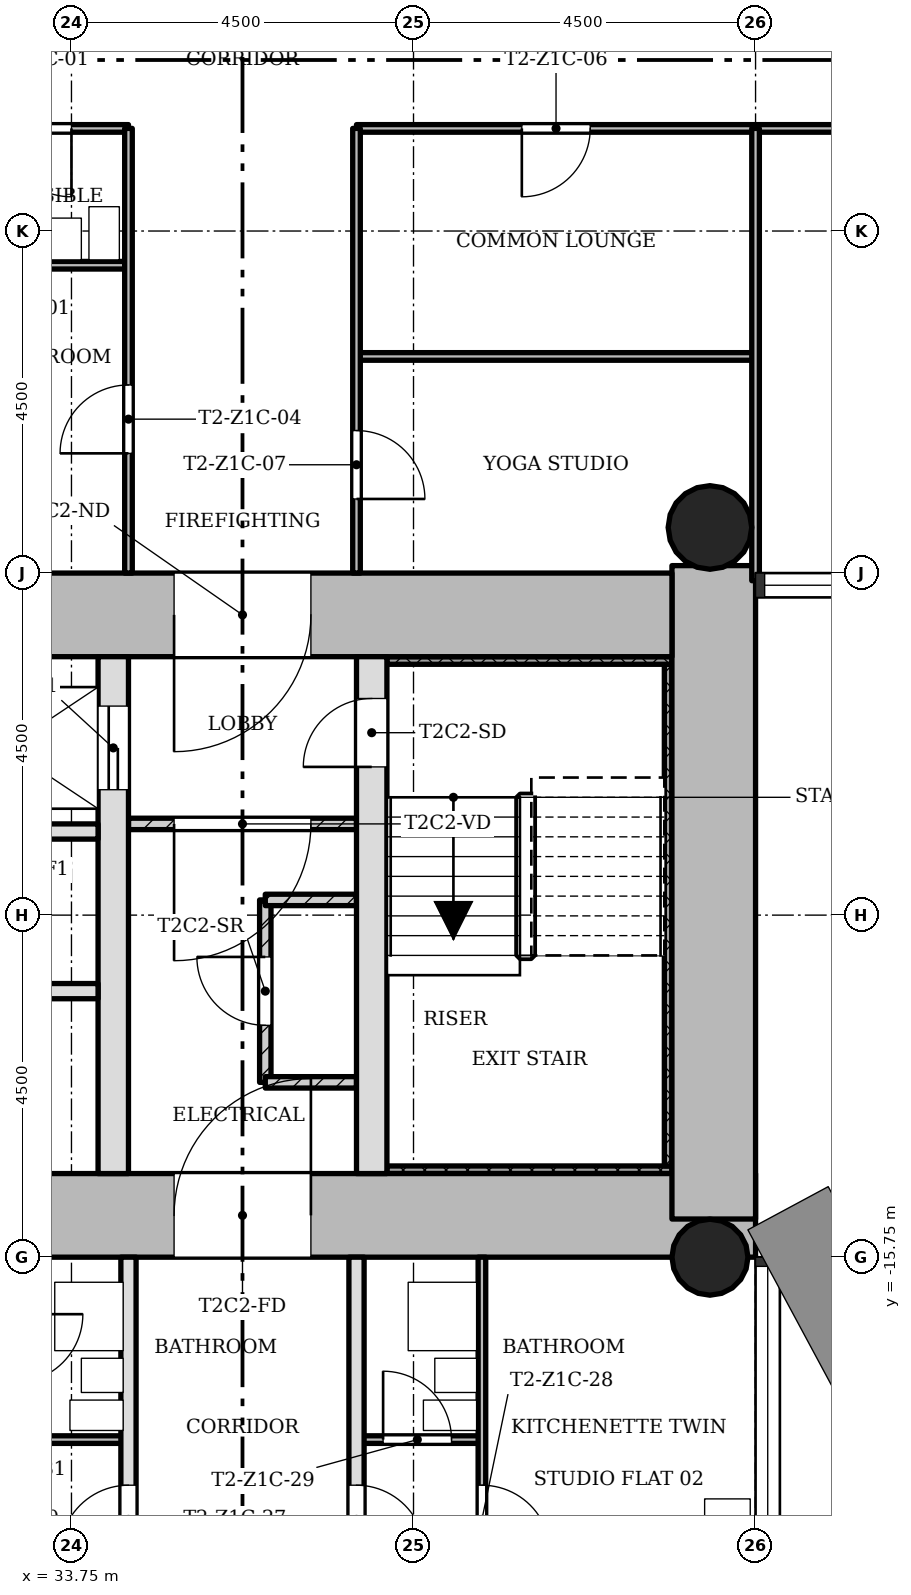
"""IFC4 building model, lengths in metres.
Left out: names, types, materials, properties, quantities, classifications, styles, units other than length and angle.
Written with IfcOpenShell. Run it as: python <this file> out.ifc"""

import sys

from ifc_helpers import new_model, si_unit, direction, frame, frame_2d, origin, origin_2d, place, context, subcontext, project, spatial, rectangle, hollow_circle, extrude, element, fill, save


model = new_model("IFC4")
c1 = context("Model", 3, precision=1e-05, world=origin(), true_north=direction((0.0, 1.0)))
c2 = subcontext(c1, "Body", "Model", "MODEL_VIEW")
j1 = project(units=[si_unit("LENGTHUNIT", "METRE"), si_unit("PLANEANGLEUNIT", "RADIAN")], contexts=[c1])
p1 = place(None, origin())
s1 = spatial("IfcSite", under=j1, at=p1, CompositionType="ELEMENT")
p2 = place(p1, origin())
s2 = spatial("IfcBuilding", under=s1, at=p2, CompositionType="ELEMENT")
p3 = place(p2, frame((0.0, 0.0, 51.7)))
s3 = spatial("IfcBuildingStorey", under=s2, at=p3, CompositionType="ELEMENT", Elevation=51.7)
p4 = place(p3, frame((30.35, -15.2, 0.0), z_axis=(0.0, 0.0, 1.0), x_axis=(1.0, 0.0, 0.0)))
e1 = element("IfcWall", 1, at=p4, inside=s3, PredefinedType="SHEAR", context=c2, shape_type="SweptSolid", body=[
    extrude(rectangle(XDim=12.4, YDim=1.1, at=frame_2d((6.2, 0.0))), origin(), (0.0, 0.0, 1.0), 3.4),
])
p5 = place(p4, frame((4.75, 0.0, 0.0)))
e2 = element("IfcOpeningElement", 2, at=p5, cuts=e1, PredefinedType="OPENING", context=c2, shape_type="SweptSolid", body=[
    extrude(rectangle(XDim=1.8, YDim=2.1, at=frame_2d((0.9, 1.05))), frame((0.0, 0.56, 0.0), z_axis=(0.0, -1.0, 0.0), x_axis=(1.0, 0.0, 0.0)), (0.0, 0.0, 1.0), 1.12),
])
p6 = place(p3, frame((42.2, -15.248, 0.0), z_axis=(0.0, 0.0, 1.0), x_axis=(0.0, 1.0, 0.0)))
e3 = element("IfcWall", 3, at=p6, inside=s3, PredefinedType="SHEAR", context=c2, shape_type="SweptSolid", body=[
    extrude(rectangle(XDim=8.596, YDim=1.1, at=frame_2d((4.298, 0.0))), origin(), (0.0, 0.0, 1.0), 3.4),
])
p7 = place(p3, frame((41.65, -7.3, 0.0), z_axis=(0.0, 0.0, 1.0), x_axis=(-1.0, 0.0, 0.0)))
e4 = element("IfcWall", 4, at=p7, inside=s3, PredefinedType="SHEAR", context=c2, shape_type="SweptSolid", body=[
    extrude(rectangle(XDim=12.4, YDim=1.1, at=frame_2d((6.2, 0.0))), origin(), (0.0, 0.0, 1.0), 3.4),
])
p8 = place(p7, frame((4.75, 0.0, 0.0)))
e5 = element("IfcOpeningElement", 5, at=p8, cuts=e4, PredefinedType="OPENING", context=c2, shape_type="SweptSolid", body=[
    extrude(rectangle(XDim=1.8, YDim=2.1, at=frame_2d((0.9, 1.05))), frame((0.0, 0.56, 0.0), z_axis=(0.0, -1.0, 0.0), x_axis=(1.0, 0.0, 0.0)), (0.0, 0.0, 1.0), 1.12),
])
p9 = place(p3, frame((34.3, -14.65, 0.0), z_axis=(0.0, 0.0, 1.0), x_axis=(0.0, 1.0, 0.0)))
e6 = element("IfcWall", 6, at=p9, inside=s3, PredefinedType="SHEAR", context=c2, shape_type="SweptSolid", body=[
    extrude(rectangle(XDim=6.8, YDim=0.4, at=frame_2d((3.4, 0.0))), origin(), (0.0, 0.0, 1.0), 3.4),
])
p10 = place(p9, frame((5.05, 0.0, 0.0)))
e7 = element("IfcOpeningElement", 7, at=p10, cuts=e6, PredefinedType="OPENING", context=c2, shape_type="SweptSolid", body=[
    extrude(rectangle(XDim=1.1, YDim=2.1, at=frame_2d((0.55, 1.05))), frame((0.0, 0.21, 0.0), z_axis=(0.0, -1.0, 0.0), x_axis=(1.0, 0.0, 0.0)), (0.0, 0.0, 1.0), 0.42),
])
p11 = place(p3, frame((37.7, -14.65, 0.0), z_axis=(0.0, 0.0, 1.0), x_axis=(0.0, 1.0, 0.0)))
e8 = element("IfcWall", 8, at=p11, inside=s3, PredefinedType="SHEAR", context=c2, shape_type="SweptSolid", body=[
    extrude(rectangle(XDim=6.8, YDim=0.4, at=frame_2d((3.4, 0.0))), origin(), (0.0, 0.0, 1.0), 3.4),
])
p12 = place(p11, frame((5.35, 0.0, 0.0)))
e9 = element("IfcOpeningElement", 9, at=p12, cuts=e8, PredefinedType="OPENING", context=c2, shape_type="SweptSolid", body=[
    extrude(rectangle(XDim=0.9, YDim=2.1, at=frame_2d((0.45, 1.05))), frame((0.0, 0.21, 0.0), z_axis=(0.0, -1.0, 0.0), x_axis=(1.0, 0.0, 0.0)), (0.0, 0.0, 1.0), 0.42),
])
p13 = place(p3, frame((42.15, -15.75, 0.0), z_axis=(0.0, 0.0, 1.0), x_axis=(1.0, 0.0, 0.0)))
e10 = element("IfcColumn", 10, at=p13, inside=s3, PredefinedType="COLUMN", context=c2, shape_type="SweptSolid", body=[
    extrude(hollow_circle(Radius=0.5, WallThickness=0.036, at=origin_2d()), origin(), (0.0, 0.0, 1.0), 3.4),
])
p14 = place(p3, frame((42.15, -6.15, 0.0), z_axis=(0.0, 0.0, 1.0), x_axis=(1.0, 0.0, 0.0)))
e11 = element("IfcColumn", 11, at=p14, inside=s3, PredefinedType="COLUMN", context=c2, shape_type="SweptSolid", body=[
    extrude(hollow_circle(Radius=0.55, WallThickness=0.04, at=origin_2d()), origin(), (0.0, 0.0, 1.0), 3.4),
])
p15 = place(p3, frame((34.5, -10.05, 0.0), z_axis=(0.0, 0.0, 1.0), x_axis=(1.0, 0.0, 0.0)))
e12 = element("IfcWall", 12, at=p15, inside=s3, PredefinedType="PARTITIONING", context=c2, shape_type="SweptSolid", body=[
    extrude(rectangle(XDim=3.0, YDim=0.15, at=frame_2d((1.5, 0.0))), origin(), (0.0, 0.0, 1.0), 3.0),
])
p16 = place(p15, frame((0.6, 0.0, 0.0)))
e13 = element("IfcOpeningElement", 13, at=p16, cuts=e12, PredefinedType="OPENING", context=c2, shape_type="SweptSolid", body=[
    extrude(rectangle(XDim=1.8, YDim=2.1, at=frame_2d((0.9, 1.05))), frame((0.0, 0.085, 0.0), z_axis=(0.0, -1.0, 0.0), x_axis=(1.0, 0.0, 0.0)), (0.0, 0.0, 1.0), 0.17),
])
for number, where, z_axis, x_axis in (
    (14, (30.35, -10.15, 0.0), (0.0, 0.0, 1.0), (1.0, 0.0, 0.0)),
    (15, (30.35, -12.25, 0.0), (0.0, 0.0, 1.0), (1.0, 0.0, 0.0)),
):
    element("IfcWall", number, at=place(p3, frame(where, z_axis=z_axis, x_axis=x_axis)), inside=s3, PredefinedType="SOLIDWALL", context=c2, shape_type="SweptSolid", body=[
        extrude(rectangle(XDim=3.75, YDim=0.2, at=frame_2d((1.875, 0.0))), origin(), (0.0, 0.0, 1.0), 3.0),
    ])
p17 = place(p3, frame((36.3, -11.05, 0.0), z_axis=(0.0, 0.0, 1.0), x_axis=(0.0, -1.0, 0.0)))
e16 = element("IfcWall", 16, at=p17, inside=s3, PredefinedType="PARTITIONING", context=c2, shape_type="SweptSolid", body=[
    extrude(rectangle(XDim=2.4, YDim=0.15, at=frame_2d((1.2, 0.0))), origin(), (0.0, 0.0, 1.0), 3.0),
])
p18 = place(p17, frame((0.75, 0.0, 0.0)))
e17 = element("IfcOpeningElement", 17, at=p18, cuts=e16, PredefinedType="OPENING", context=c2, shape_type="SweptSolid", body=[
    extrude(rectangle(XDim=0.9, YDim=2.1, at=frame_2d((0.45, 1.05))), frame((0.0, 0.085, 0.0), z_axis=(0.0, -1.0, 0.0), x_axis=(1.0, 0.0, 0.0)), (0.0, 0.0, 1.0), 0.17),
])
for number, where, z_axis, x_axis in (
    (18, (36.3, -11.05, 0.0), (0.0, 0.0, 1.0), (1.0, 0.0, 0.0)),
    (19, (36.3, -13.45, 0.0), (0.0, 0.0, 1.0), (1.0, 0.0, 0.0)),
):
    element("IfcWall", number, at=place(p3, frame(where, z_axis=z_axis, x_axis=x_axis)), inside=s3, PredefinedType="PARTITIONING", context=c2, shape_type="SweptSolid", body=[
        extrude(rectangle(XDim=1.2, YDim=0.15, at=frame_2d((0.6, 0.0))), origin(), (0.0, 0.0, 1.0), 3.0),
    ])
p19 = place(p3, frame((39.15, -18.15, 0.0), z_axis=(0.0, 0.0, 1.0), x_axis=(-1.0, 0.0, 0.0)))
e20 = element("IfcWall", 20, at=p19, inside=s3, PredefinedType="PARTITIONING", context=c2, shape_type="SweptSolid", body=[
    extrude(rectangle(XDim=1.65, YDim=0.1, at=frame_2d((0.825, 0.0))), origin(), (0.0, 0.0, 1.0), 3.0),
])
p20 = place(p19, frame((0.4, 0.0, 0.0)))
e21 = element("IfcOpeningElement", 21, at=p20, cuts=e20, PredefinedType="OPENING", context=c2, shape_type="SweptSolid", body=[
    extrude(rectangle(XDim=0.9, YDim=2.1, at=frame_2d((0.45, 1.05))), frame((0.0, 0.06, 0.0), z_axis=(0.0, -1.0, 0.0), x_axis=(1.0, 0.0, 0.0)), (0.0, 0.0, 1.0), 0.12),
])
p21 = place(p3, frame((34.5, -18.15, 0.0), z_axis=(0.0, 0.0, 1.0), x_axis=(-1.0, 0.0, 0.0)))
e22 = element("IfcWall", 22, at=p21, inside=s3, PredefinedType="PARTITIONING", context=c2, shape_type="SweptSolid", body=[
    extrude(rectangle(XDim=1.5, YDim=0.1, at=frame_2d((0.75, 0.0))), origin(), (0.0, 0.0, 1.0), 3.0),
])
p22 = place(p3, frame((42.75, -3.9, 0.0), z_axis=(0.0, 0.0, 1.0), x_axis=(-1.0, 0.0, 0.0)))
e23 = element("IfcWall", 23, at=p22, inside=s3, PredefinedType="PARTITIONING", context=c2, shape_type="SweptSolid", body=[
    extrude(rectangle(XDim=5.25, YDim=0.1, at=frame_2d((2.625, 0.0))), origin(), (0.0, 0.0, 1.0), 3.0),
])
p23 = place(p3, frame((34.5, -2.7, 0.0), z_axis=(0.0, 0.0, 1.0), x_axis=(-1.0, 0.0, 0.0)))
e24 = element("IfcWall", 24, at=p23, inside=s3, PredefinedType="PARTITIONING", context=c2, shape_type="SweptSolid", body=[
    extrude(rectangle(XDim=2.4, YDim=0.1, at=frame_2d((1.2, 0.0))), origin(), (0.0, 0.0, 1.0), 3.0),
])
p24 = place(p3, frame((44.55, -0.9, 0.0), z_axis=(0.0, 0.0, 1.0), x_axis=(-1.0, 0.0, 0.0)))
e25 = element("IfcWall", 25, at=p24, inside=s3, PredefinedType="PARTITIONING", context=c2, shape_type="SweptSolid", body=[
    extrude(rectangle(XDim=7.05, YDim=0.1, at=frame_2d((3.525, 0.0))), origin(), (0.0, 0.0, 1.0), 3.0),
])
p25 = place(p24, frame((3.975, 0.0, 0.0)))
e26 = element("IfcOpeningElement", 26, at=p25, cuts=e25, PredefinedType="OPENING", context=c2, shape_type="SweptSolid", body=[
    extrude(rectangle(XDim=0.9, YDim=2.1, at=frame_2d((0.45, 1.05))), frame((0.0, 0.06, 0.0), z_axis=(0.0, -1.0, 0.0), x_axis=(1.0, 0.0, 0.0)), (0.0, 0.0, 1.0), 0.12),
])
p26 = place(p3, frame((34.5, -0.9, 0.0), z_axis=(0.0, 0.0, 1.0), x_axis=(-1.0, 0.0, 0.0)))
e27 = element("IfcWall", 27, at=p26, inside=s3, PredefinedType="PARTITIONING", context=c2, shape_type="SweptSolid", body=[
    extrude(rectangle(XDim=7.05, YDim=0.1, at=frame_2d((3.525, 0.0))), origin(), (0.0, 0.0, 1.0), 3.0),
])
p27 = place(p26, frame((0.75, 0.0, 0.0)))
e28 = element("IfcOpeningElement", 28, at=p27, cuts=e27, PredefinedType="OPENING", context=c2, shape_type="SweptSolid", body=[
    extrude(rectangle(XDim=0.9, YDim=2.1, at=frame_2d((0.45, 1.05))), frame((0.0, 0.06, 0.0), z_axis=(0.0, -1.0, 0.0), x_axis=(1.0, 0.0, 0.0)), (0.0, 0.0, 1.0), 0.12),
])
p28 = place(p26, frame((3.375, 0.0, 0.0)))
e29 = element("IfcOpeningElement", 29, at=p28, cuts=e27, PredefinedType="OPENING", context=c2, shape_type="SweptSolid", body=[
    extrude(rectangle(XDim=0.9, YDim=2.1, at=frame_2d((0.45, 1.05))), frame((0.0, 0.06, 0.0), z_axis=(0.0, -1.0, 0.0), x_axis=(1.0, 0.0, 0.0)), (0.0, 0.0, 1.0), 0.12),
])
p29 = place(p3, frame((42.75, -6.85, 0.0), z_axis=(0.0, 0.0, 1.0), x_axis=(0.0, 1.0, 0.0)))
e30 = element("IfcWall", 30, at=p29, inside=s3, PredefinedType="PARTITIONING", context=c2, shape_type="SweptSolid", body=[
    extrude(rectangle(XDim=5.95, YDim=0.1, at=frame_2d((2.975, 0.0))), origin(), (0.0, 0.0, 1.0), 3.0),
])
p30 = place(p3, frame((39.15, -20.25, 0.0), z_axis=(0.0, 0.0, 1.0), x_axis=(0.0, 1.0, 0.0)))
e31 = element("IfcWall", 31, at=p30, inside=s3, PredefinedType="PARTITIONING", context=c2, shape_type="SweptSolid", body=[
    extrude(rectangle(XDim=4.5, YDim=0.1, at=frame_2d((2.25, 0.0))), origin(), (0.0, 0.0, 1.0), 3.0),
])
p31 = place(p30, frame((0.6, 0.0, 0.0)))
e32 = element("IfcOpeningElement", 32, at=p31, cuts=e31, PredefinedType="OPENING", context=c2, shape_type="SweptSolid", body=[
    extrude(rectangle(XDim=0.9, YDim=2.1, at=frame_2d((0.45, 1.05))), frame((0.0, 0.06, 0.0), z_axis=(0.0, -1.0, 0.0), x_axis=(1.0, 0.0, 0.0)), (0.0, 0.0, 1.0), 0.12),
])
p32 = place(p3, frame((37.5, -6.75, 0.0), z_axis=(0.0, 0.0, 1.0), x_axis=(0.0, 1.0, 0.0)))
e33 = element("IfcWall", 33, at=p32, inside=s3, PredefinedType="PARTITIONING", context=c2, shape_type="SweptSolid", body=[
    extrude(rectangle(XDim=5.85, YDim=0.1, at=frame_2d((2.925, 0.0))), origin(), (0.0, 0.0, 1.0), 3.0),
])
p33 = place(p32, frame((0.975, 0.0, 0.0)))
e34 = element("IfcOpeningElement", 34, at=p33, cuts=e33, PredefinedType="OPENING", context=c2, shape_type="SweptSolid", body=[
    extrude(rectangle(XDim=0.9, YDim=2.1, at=frame_2d((0.45, 1.05))), frame((0.0, 0.06, 0.0), z_axis=(0.0, -1.0, 0.0), x_axis=(1.0, 0.0, 0.0)), (0.0, 0.0, 1.0), 0.12),
])
p34 = place(p3, frame((37.5, -20.25, 0.0), z_axis=(0.0, 0.0, 1.0), x_axis=(0.0, 1.0, 0.0)))
e35 = element("IfcWall", 35, at=p34, inside=s3, PredefinedType="SOLIDWALL", context=c2, shape_type="SweptSolid", body=[
    extrude(rectangle(XDim=4.5, YDim=0.2, at=frame_2d((2.25, 0.0))), origin(), (0.0, 0.0, 1.0), 3.0),
])
p35 = place(p34, frame((0.6, 0.0, 0.0)))
e36 = element("IfcOpeningElement", 36, at=p35, cuts=e35, PredefinedType="OPENING", context=c2, shape_type="SweptSolid", body=[
    extrude(rectangle(XDim=0.9, YDim=2.1, at=frame_2d((0.45, 1.05))), frame((0.0, 0.11, 0.0), z_axis=(0.0, -1.0, 0.0), x_axis=(1.0, 0.0, 0.0)), (0.0, 0.0, 1.0), 0.22),
])
p36 = place(p3, frame((34.5, -6.75, 0.0), z_axis=(0.0, 0.0, 1.0), x_axis=(0.0, 1.0, 0.0)))
e37 = element("IfcWall", 37, at=p36, inside=s3, PredefinedType="PARTITIONING", context=c2, shape_type="SweptSolid", body=[
    extrude(rectangle(XDim=5.85, YDim=0.1, at=frame_2d((2.925, 0.0))), origin(), (0.0, 0.0, 1.0), 3.0),
])
p37 = place(p36, frame((1.575, 0.0, 0.0)))
e38 = element("IfcOpeningElement", 38, at=p37, cuts=e37, PredefinedType="OPENING", context=c2, shape_type="SweptSolid", body=[
    extrude(rectangle(XDim=0.9, YDim=2.1, at=frame_2d((0.45, 1.05))), frame((0.0, 0.06, 0.0), z_axis=(0.0, -1.0, 0.0), x_axis=(1.0, 0.0, 0.0)), (0.0, 0.0, 1.0), 0.12),
])
p38 = place(p3, frame((34.5, -20.25, 0.0), z_axis=(0.0, 0.0, 1.0), x_axis=(0.0, 1.0, 0.0)))
e39 = element("IfcWall", 39, at=p38, inside=s3, PredefinedType="SOLIDWALL", context=c2, shape_type="SweptSolid", body=[
    extrude(rectangle(XDim=4.5, YDim=0.2, at=frame_2d((2.25, 0.0))), origin(), (0.0, 0.0, 1.0), 3.0),
])
p39 = place(p38, frame((0.6, 0.0, 0.0)))
e40 = element("IfcOpeningElement", 40, at=p39, cuts=e39, PredefinedType="OPENING", context=c2, shape_type="SweptSolid", body=[
    extrude(rectangle(XDim=0.9, YDim=2.1, at=frame_2d((0.45, 1.05))), frame((0.0, 0.11, 0.0), z_axis=(0.0, -1.0, 0.0), x_axis=(1.0, 0.0, 0.0)), (0.0, 0.0, 1.0), 0.22),
])
p40 = place(p3, frame((37.9, -14.6, 0.0), z_axis=(0.0, 0.0, 1.0), x_axis=(1.0, 0.0, 0.0)))
e41 = element("IfcWall", 41, at=p40, inside=s3, PredefinedType="SHEAR", context=c2, shape_type="SweptSolid", body=[
    extrude(rectangle(XDim=3.75, YDim=0.1, at=frame_2d((1.875, 0.0))), origin(), (0.0, 0.0, 1.0), 3.4),
])
p41 = place(p3, frame((41.6, -7.95, 0.0), z_axis=(0.0, 0.0, 1.0), x_axis=(0.0, -1.0, 0.0)))
e42 = element("IfcWall", 42, at=p41, inside=s3, PredefinedType="SHEAR", context=c2, shape_type="SweptSolid", body=[
    extrude(rectangle(XDim=6.6, YDim=0.1, at=frame_2d((3.3, 0.0))), origin(), (0.0, 0.0, 1.0), 3.4),
])
p42 = place(p3, frame((37.9, -7.9, 0.0), z_axis=(0.0, 0.0, 1.0), x_axis=(1.0, 0.0, 0.0)))
e43 = element("IfcWall", 43, at=p42, inside=s3, PredefinedType="SHEAR", context=c2, shape_type="SweptSolid", body=[
    extrude(rectangle(XDim=3.75, YDim=0.1, at=frame_2d((1.875, 0.0))), origin(), (0.0, 0.0, 1.0), 3.4),
])
p43 = place(p16, origin())
e44 = element("IfcDoor", 44, at=p43, inside=s3, OperationType="SINGLE_SWING_LEFT", PredefinedType="DOOR", context=c2, shape_type="SweptSolid", body=[
    extrude(rectangle(XDim=1.8, YDim=2.1, at=frame_2d((0.9, 1.05))), frame((0.0, 0.025, 0.0), z_axis=(0.0, -1.0, 0.0), x_axis=(1.0, 0.0, 0.0)), (0.0, 0.0, 1.0), 0.05),
])
fill(e13, e44)
p44 = place(p18, origin())
e45 = element("IfcDoor", 45, at=p44, inside=s3, OperationType="SINGLE_SWING_LEFT", PredefinedType="DOOR", context=c2, shape_type="SweptSolid", body=[
    extrude(rectangle(XDim=0.9, YDim=2.1, at=frame_2d((0.45, 1.05))), frame((0.0, 0.025, 0.0), z_axis=(0.0, -1.0, 0.0), x_axis=(1.0, 0.0, 0.0)), (0.0, 0.0, 1.0), 0.05),
])
fill(e17, e45)
p45 = place(p27, origin())
e46 = element("IfcDoor", 46, at=p45, inside=s3, OperationType="SINGLE_SWING_RIGHT", PredefinedType="DOOR", context=c2, shape_type="SweptSolid", body=[
    extrude(rectangle(XDim=0.9, YDim=2.1, at=frame_2d((0.45, 1.05))), frame((0.0, 0.025, 0.0), z_axis=(0.0, -1.0, 0.0), x_axis=(1.0, 0.0, 0.0)), (0.0, 0.0, 1.0), 0.05),
])
fill(e28, e46)
p46 = place(p37, origin())
e47 = element("IfcDoor", 47, at=p46, inside=s3, OperationType="SINGLE_SWING_RIGHT", PredefinedType="DOOR", context=c2, shape_type="SweptSolid", body=[
    extrude(rectangle(XDim=0.9, YDim=2.1, at=frame_2d((0.45, 1.05))), frame((0.0, 0.025, 0.0), z_axis=(0.0, -1.0, 0.0), x_axis=(1.0, 0.0, 0.0)), (0.0, 0.0, 1.0), 0.05),
])
fill(e38, e47)
p47 = place(p25, origin())
e48 = element("IfcDoor", 48, at=p47, inside=s3, OperationType="SINGLE_SWING_LEFT", PredefinedType="DOOR", context=c2, shape_type="SweptSolid", body=[
    extrude(rectangle(XDim=0.9, YDim=2.1, at=frame_2d((0.45, 1.05))), frame((0.0, 0.025, 0.0), z_axis=(0.0, -1.0, 0.0), x_axis=(1.0, 0.0, 0.0)), (0.0, 0.0, 1.0), 0.05),
])
fill(e26, e48)
p48 = place(p33, origin())
e49 = element("IfcDoor", 49, at=p48, inside=s3, OperationType="SINGLE_SWING_LEFT", PredefinedType="DOOR", context=c2, shape_type="SweptSolid", body=[
    extrude(rectangle(XDim=0.9, YDim=2.1, at=frame_2d((0.45, 1.05))), frame((0.0, 0.025, 0.0), z_axis=(0.0, -1.0, 0.0), x_axis=(1.0, 0.0, 0.0)), (0.0, 0.0, 1.0), 0.05),
])
fill(e34, e49)
p49 = place(p35, origin())
e50 = element("IfcDoor", 50, at=p49, inside=s3, OperationType="SINGLE_SWING_LEFT", PredefinedType="DOOR", context=c2, shape_type="SweptSolid", body=[
    extrude(rectangle(XDim=0.9, YDim=2.1, at=frame_2d((0.45, 1.05))), frame((0.0, 0.025, 0.0), z_axis=(0.0, -1.0, 0.0), x_axis=(1.0, 0.0, 0.0)), (0.0, 0.0, 1.0), 0.05),
])
fill(e36, e50)
p50 = place(p31, origin())
e51 = element("IfcDoor", 51, at=p50, inside=s3, OperationType="SINGLE_SWING_LEFT", PredefinedType="DOOR", context=c2, shape_type="SweptSolid", body=[
    extrude(rectangle(XDim=0.9, YDim=2.1, at=frame_2d((0.45, 1.05))), frame((0.0, 0.025, 0.0), z_axis=(0.0, -1.0, 0.0), x_axis=(1.0, 0.0, 0.0)), (0.0, 0.0, 1.0), 0.05),
])
fill(e32, e51)
p51 = place(p20, origin())
e52 = element("IfcDoor", 52, at=p51, inside=s3, OperationType="SINGLE_SWING_RIGHT", PredefinedType="DOOR", context=c2, shape_type="SweptSolid", body=[
    extrude(rectangle(XDim=0.9, YDim=2.1, at=frame_2d((0.45, 1.05))), frame((0.0, 0.025, 0.0), z_axis=(0.0, -1.0, 0.0), x_axis=(1.0, 0.0, 0.0)), (0.0, 0.0, 1.0), 0.05),
])
fill(e21, e52)
p52 = place(p39, origin())
e53 = element("IfcDoor", 53, at=p52, inside=s3, OperationType="SINGLE_SWING_RIGHT", PredefinedType="DOOR", context=c2, shape_type="SweptSolid", body=[
    extrude(rectangle(XDim=0.9, YDim=2.1, at=frame_2d((0.45, 1.05))), frame((0.0, 0.025, 0.0), z_axis=(0.0, -1.0, 0.0), x_axis=(1.0, 0.0, 0.0)), (0.0, 0.0, 1.0), 0.05),
])
fill(e40, e53)
p53 = place(p12, origin())
e54 = element("IfcDoor", 54, at=p53, inside=s3, OperationType="SINGLE_SWING_RIGHT", PredefinedType="DOOR", context=c2, shape_type="SweptSolid", body=[
    extrude(rectangle(XDim=0.9, YDim=2.1, at=frame_2d((0.45, 1.05))), frame((0.0, 0.025, 0.0), z_axis=(0.0, -1.0, 0.0), x_axis=(1.0, 0.0, 0.0)), (0.0, 0.0, 1.0), 0.05),
])
fill(e9, e54)
p54 = place(p10, origin())
e55 = element("IfcDoor", 55, at=p54, inside=s3, OperationType="SLIDING_TO_LEFT", PredefinedType="DOOR", context=c2, shape_type="SweptSolid", body=[
    extrude(rectangle(XDim=1.1, YDim=2.1, at=frame_2d((0.55, 1.05))), frame((0.0, 0.025, 0.0), z_axis=(0.0, -1.0, 0.0), x_axis=(1.0, 0.0, 0.0)), (0.0, 0.0, 1.0), 0.05),
])
fill(e7, e55)
p55 = place(p8, origin())
e56 = element("IfcDoor", 56, at=p55, inside=s3, OperationType="SINGLE_SWING_LEFT", PredefinedType="DOOR", context=c2, shape_type="SweptSolid", body=[
    extrude(rectangle(XDim=1.8, YDim=2.1, at=frame_2d((0.9, 1.05))), frame((0.0, 0.025, 0.0), z_axis=(0.0, -1.0, 0.0), x_axis=(1.0, 0.0, 0.0)), (0.0, 0.0, 1.0), 0.05),
])
fill(e5, e56)
p56 = place(p5, origin())
e57 = element("IfcDoor", 57, at=p56, inside=s3, OperationType="SINGLE_SWING_LEFT", PredefinedType="DOOR", context=c2, shape_type="SweptSolid", body=[
    extrude(rectangle(XDim=1.8, YDim=2.1, at=frame_2d((0.9, 1.05))), frame((0.0, 0.025, 0.0), z_axis=(0.0, -1.0, 0.0), x_axis=(1.0, 0.0, 0.0)), (0.0, 0.0, 1.0), 0.05),
])
fill(e2, e57)
save(model, sys.argv[1])
